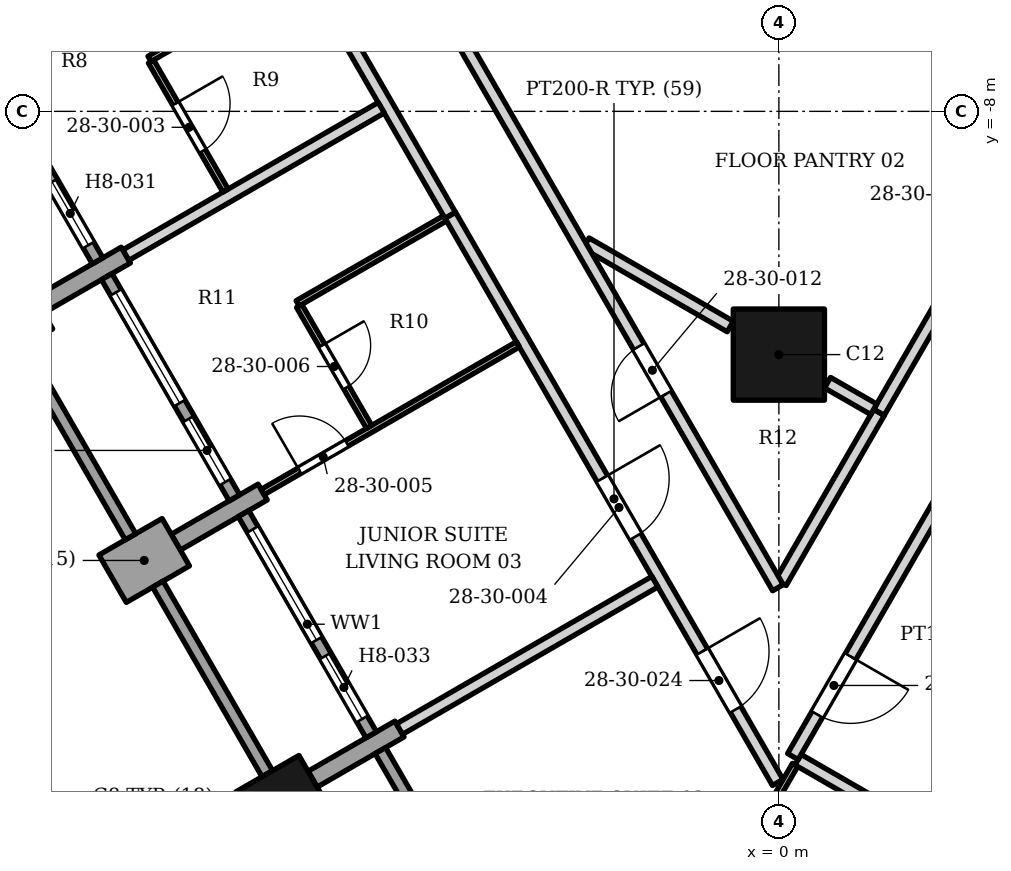
"""IFC4 building model, lengths in metres.
Left out: names, types, materials, properties, quantities, classifications, styles, units other than length and angle.
Written with IfcOpenShell. Run it as: python <this file> out.ifc"""

import sys

from ifc_helpers import new_model, si_unit, direction, frame, frame_2d, origin, origin_2d, place, context, subcontext, project, spatial, rectangle, extrude, element, fill, save


model = new_model("IFC4")
c1 = context("Model", 3, precision=1e-05, world=origin(), true_north=direction((0.0, 1.0)))
c2 = subcontext(c1, "Body", "Model", "MODEL_VIEW")
j1 = project(units=[si_unit("LENGTHUNIT", "METRE"), si_unit("PLANEANGLEUNIT", "RADIAN")], contexts=[c1])
p1 = place(None, origin())
s1 = spatial("IfcSite", under=j1, at=p1, CompositionType="ELEMENT")
p2 = place(p1, origin())
s2 = spatial("IfcBuilding", under=s1, at=p2, CompositionType="ELEMENT")
p3 = place(p2, frame((0.0, 0.0, 122.4)))
s3 = spatial("IfcBuildingStorey", under=s2, at=p3, CompositionType="ELEMENT", Elevation=122.4)
p4 = place(p3, frame((0.0, -12.0, 0.0), z_axis=(0.0, 0.0, 1.0), x_axis=(1.0, 0.0, 0.0)))
e1 = element("IfcColumn", 1, at=p4, inside=s3, PredefinedType="COLUMN", context=c2, shape_type="SweptSolid", body=[
    extrude(rectangle(XDim=1.5, YDim=1.5, at=origin_2d()), origin(), (0.0, 0.0, 1.0), 3.4),
])
for number, where, z_axis, x_axis in (
    (2, (-12.688, -11.488, 0.0), (0.0, 0.0, 1.0), (0.5, -0.866, 0.0)),
    (3, (-8.188, -19.282, 0.0), (0.0, 0.0, 1.0), (0.5, -0.866, 0.0)),
):
    element("IfcColumn", number, at=place(p3, frame(where, z_axis=z_axis, x_axis=x_axis)), inside=s3, PredefinedType="COLUMN", context=c2, shape_type="SweptSolid", body=[
        extrude(rectangle(XDim=0.9, YDim=1.2, at=origin_2d()), origin(), (0.0, 0.0, 1.0), 3.4),
    ])
p5 = place(p3, frame((-12.168, -11.188, 0.0), z_axis=(0.0, 0.0, 1.0), x_axis=(0.865966208357, 0.500102515474, 0.0)))
e4 = element("IfcWall", 4, at=p5, inside=s3, PredefinedType="SOLIDWALL", context=c2, shape_type="SweptSolid", body=[
    extrude(rectangle(XDim=1.65, YDim=0.3, at=frame_2d((0.825, 0.0))), origin(), (0.0, 0.0, 1.0), 2.242),
])
p6 = place(p3, frame((-10.958, -15.685, 0.0), z_axis=(0.0, 0.0, 1.0), x_axis=(0.866043267704, 0.499969057507, 0.0)))
e5 = element("IfcWall", 5, at=p6, inside=s3, PredefinedType="SOLIDWALL", context=c2, shape_type="SweptSolid", body=[
    extrude(rectangle(XDim=1.2, YDim=0.9, at=frame_2d((0.6, 0.0))), origin(), (0.0, 0.0, 1.0), 2.63),
])
p7 = place(p3, frame((-9.919, -15.085, 0.0), z_axis=(0.0, 0.0, 1.0), x_axis=(0.866040211805, 0.499974350878, 0.0)))
e6 = element("IfcWall", 6, at=p7, inside=s3, PredefinedType="SOLIDWALL", context=c2, shape_type="SweptSolid", body=[
    extrude(rectangle(XDim=1.65, YDim=0.3, at=frame_2d((0.825, 0.0))), origin(), (0.0, 0.0, 1.0), 2.65),
])
p8 = place(p3, frame((-6.24, -18.157, 0.0), z_axis=(0.0, 0.0, 1.0), x_axis=(-0.866030301974, -0.499991515992, 0.0)))
e7 = element("IfcWall", 7, at=p8, inside=s3, PredefinedType="SOLIDWALL", context=c2, shape_type="SweptSolid", body=[
    extrude(rectangle(XDim=1.649, YDim=0.3, at=frame_2d((0.825, 0.0))), origin(), (0.0, 0.0, 1.0), 2.65),
])
p9 = place(p3, frame((-13.304, -6.821, 0.0), z_axis=(0.0, 0.0, 1.0), x_axis=(0.500027713859, -0.866009402589, 0.0)))
e8 = element("IfcWall", 8, at=p9, inside=s3, PredefinedType="ELEMENTEDWALL", context=c2, shape_type="SweptSolid", body=[
    extrude(rectangle(XDim=4.2, YDim=0.2, at=frame_2d((2.1, 0.0))), origin(), (0.0, 0.0, 1.0), 2.242),
])
p10 = place(p9, frame((0.3, 0.0, 0.6)))
e9 = element("IfcOpeningElement", 9, at=p10, cuts=e8, PredefinedType="OPENING", context=c2, shape_type="SweptSolid", body=[
    extrude(rectangle(XDim=2.1, YDim=1.54, at=frame_2d((1.05, 0.77))), frame((0.0, 0.11, 0.0), z_axis=(0.0, -1.0, 0.0), x_axis=(1.0, 0.0, 0.0)), (0.0, 0.0, 1.0), 0.22),
])
p11 = place(p9, frame((2.7, 0.0, 0.0)))
e10 = element("IfcOpeningElement", 10, at=p11, cuts=e8, PredefinedType="OPENING", context=c2, shape_type="SweptSolid", body=[
    extrude(rectangle(XDim=1.2, YDim=2.14, at=frame_2d((0.6, 1.07))), frame((0.0, 0.11, 0.0), z_axis=(0.0, -1.0, 0.0), x_axis=(1.0, 0.0, 0.0)), (0.0, 0.0, 1.0), 0.22),
])
p12 = place(p3, frame((-12.463, -11.878, 0.0), z_axis=(0.0, 0.0, 1.0), x_axis=(0.500012057535, -0.866018442252, 0.0)))
e11 = element("IfcWall", 11, at=p12, inside=s3, PredefinedType="SOLIDWALL", context=c2, shape_type="SweptSolid", body=[
    extrude(rectangle(XDim=3.6, YDim=0.2, at=frame_2d((1.8, 0.0))), origin(), (0.0, 0.0, 1.0), 2.45),
])
p13 = place(p3, frame((-11.054, -10.718, 0.0), z_axis=(0.0, 0.0, 1.0), x_axis=(0.500027713859, -0.866009402589, 0.0)))
e12 = element("IfcWall", 12, at=p13, inside=s3, PredefinedType="ELEMENTEDWALL", context=c2, shape_type="SweptSolid", body=[
    extrude(rectangle(XDim=4.2, YDim=0.2, at=frame_2d((2.1, 0.0))), origin(), (0.0, 0.0, 1.0), 2.242),
])
p14 = place(p13, frame((0.3, 0.0, 0.6)))
e13 = element("IfcOpeningElement", 13, at=p14, cuts=e12, PredefinedType="OPENING", context=c2, shape_type="SweptSolid", body=[
    extrude(rectangle(XDim=2.1, YDim=1.54, at=frame_2d((1.05, 0.77))), frame((0.0, 0.11, 0.0), z_axis=(0.0, -1.0, 0.0), x_axis=(1.0, 0.0, 0.0)), (0.0, 0.0, 1.0), 0.22),
])
p15 = place(p13, frame((2.7, 0.0, 0.0)))
e14 = element("IfcOpeningElement", 14, at=p15, cuts=e12, PredefinedType="OPENING", context=c2, shape_type="SweptSolid", body=[
    extrude(rectangle(XDim=1.2, YDim=2.14, at=frame_2d((0.6, 1.07))), frame((0.0, 0.11, 0.0), z_axis=(0.0, -1.0, 0.0), x_axis=(1.0, 0.0, 0.0)), (0.0, 0.0, 1.0), 0.22),
])
p16 = place(p3, frame((-10.213, -15.775, 0.0), z_axis=(0.0, 0.0, 1.0), x_axis=(0.500012057535, -0.866018442252, 0.0)))
e15 = element("IfcWall", 15, at=p16, inside=s3, PredefinedType="SOLIDWALL", context=c2, shape_type="SweptSolid", body=[
    extrude(rectangle(XDim=3.6, YDim=0.2, at=frame_2d((1.8, 0.0))), origin(), (0.0, 0.0, 1.0), 2.63),
])
p17 = place(p3, frame((-8.804, -14.615, 0.0), z_axis=(0.0, 0.0, 1.0), x_axis=(0.500002543286, -0.866023935413, 0.0)))
e16 = element("IfcWall", 16, at=p17, inside=s3, PredefinedType="ELEMENTEDWALL", context=c2, shape_type="SweptSolid", body=[
    extrude(rectangle(XDim=4.2, YDim=0.2, at=frame_2d((2.1, 0.0))), origin(), (0.0, 0.0, 1.0), 2.65),
])
p18 = place(p17, frame((0.3, 0.0, 0.6)))
e17 = element("IfcOpeningElement", 17, at=p18, cuts=e16, PredefinedType="OPENING", context=c2, shape_type="SweptSolid", body=[
    extrude(rectangle(XDim=2.1, YDim=1.8, at=frame_2d((1.05, 0.9))), frame((0.0, 0.11, 0.0), z_axis=(0.0, -1.0, 0.0), x_axis=(1.0, 0.0, 0.0)), (0.0, 0.0, 1.0), 0.22),
])
p19 = place(p17, frame((2.7, 0.0, 0.0)))
e18 = element("IfcOpeningElement", 18, at=p19, cuts=e16, PredefinedType="OPENING", context=c2, shape_type="SweptSolid", body=[
    extrude(rectangle(XDim=1.2, YDim=2.4, at=frame_2d((0.6, 1.2))), frame((0.0, 0.11, 0.0), z_axis=(0.0, -1.0, 0.0), x_axis=(1.0, 0.0, 0.0)), (0.0, 0.0, 1.0), 0.22),
])
p20 = place(p3, frame((-6.554, -18.512, 0.0), z_axis=(0.0, 0.0, 1.0), x_axis=(0.500027713859, -0.866009402589, 0.0)))
e19 = element("IfcWall", 19, at=p20, inside=s3, PredefinedType="ELEMENTEDWALL", context=c2, shape_type="SweptSolid", body=[
    extrude(rectangle(XDim=4.2, YDim=0.2, at=frame_2d((2.1, 0.0))), origin(), (0.0, 0.0, 1.0), 2.474),
])
p21 = place(p3, frame((-5.405, -9.708, 0.0), z_axis=(0.0, 0.0, 1.0), x_axis=(0.500010215181, -0.866019505967, 0.0)))
e20 = element("IfcWall", 20, at=p21, inside=s3, PredefinedType="PARTITIONING", context=c2, shape_type="SweptSolid", body=[
    extrude(rectangle(XDim=10.771, YDim=0.2, at=frame_2d((5.386, 0.0))), origin(), (0.0, 0.0, 1.0), 2.242),
])
p22 = place(p21, frame((5.0, 0.0, 0.0)))
e21 = element("IfcOpeningElement", 21, at=p22, cuts=e20, PredefinedType="OPENING", context=c2, shape_type="SweptSolid", body=[
    extrude(rectangle(XDim=1.1, YDim=2.1, at=frame_2d((0.55, 1.05))), frame((0.0, 0.11, 0.0), z_axis=(0.0, -1.0, 0.0), x_axis=(1.0, 0.0, 0.0)), (0.0, 0.0, 1.0), 0.22),
])
p23 = place(p21, frame((8.286, 0.0, 0.0)))
e22 = element("IfcOpeningElement", 22, at=p23, cuts=e20, PredefinedType="OPENING", context=c2, shape_type="SweptSolid", body=[
    extrude(rectangle(XDim=1.1, YDim=2.1, at=frame_2d((0.55, 1.05))), frame((0.0, 0.11, 0.0), z_axis=(0.0, -1.0, 0.0), x_axis=(1.0, 0.0, 0.0)), (0.0, 0.0, 1.0), 0.22),
])
p24 = place(p3, frame((-0.76, -20.522, 0.0), z_axis=(0.0, 0.0, 1.0), x_axis=(0.500646589026, 0.865651773461, 0.0)))
e23 = element("IfcWall", 23, at=p24, inside=s3, PredefinedType="PARTITIONING", context=c2, shape_type="SweptSolid", body=[
    extrude(rectangle(XDim=2.05, YDim=0.1, at=frame_2d((1.025, 0.0))), origin(), (0.0, 0.0, 1.0), 2.474),
])
p25 = place(p3, frame((0.314, -18.661, 0.0), z_axis=(0.0, 0.0, 1.0), x_axis=(0.866027263711, -0.4999967785, 0.0)))
e24 = element("IfcWall", 24, at=p25, inside=s3, PredefinedType="PARTITIONING", context=c2, shape_type="SweptSolid", body=[
    extrude(rectangle(XDim=5.649, YDim=0.2, at=frame_2d((2.825, 0.0))), origin(), (0.0, 0.0, 1.0), 2.384),
])
p26 = place(p3, frame((-6.24, -18.158, 0.0), z_axis=(0.0, 0.0, 1.0), x_axis=(0.866175528751, 0.499739885733, 0.0)))
e25 = element("IfcWall", 25, at=p26, inside=s3, PredefinedType="PARTITIONING", context=c2, shape_type="SweptSolid", body=[
    extrude(rectangle(XDim=4.85, YDim=0.2, at=frame_2d((2.425, 0.0))), origin(), (0.0, 0.0, 1.0), 2.384),
])
p27 = place(p3, frame((0.033, -15.748, 0.0), z_axis=(0.0, 0.0, 1.0), x_axis=(0.50002566634, 0.866010584809, 0.0)))
e26 = element("IfcWall", 26, at=p27, inside=s3, PredefinedType="PARTITIONING", context=c2, shape_type="SweptSolid", body=[
    extrude(rectangle(XDim=3.229, YDim=0.2, at=frame_2d((1.615, 0.0))), origin(), (0.0, 0.0, 1.0), 2.474),
])
p28 = place(p3, frame((-8.49, -14.26, 0.0), z_axis=(0.0, 0.0, 1.0), x_axis=(0.86557903767, 0.500772333047, 0.0)))
e27 = element("IfcWall", 27, at=p28, inside=s3, PredefinedType="PARTITIONING", context=c2, shape_type="SweptSolid", body=[
    extrude(rectangle(XDim=4.85, YDim=0.1, at=frame_2d((2.425, 0.0))), origin(), (0.0, 0.0, 1.0), 2.242),
])
p29 = place(p28, frame((0.7, 0.0, 0.0)))
e28 = element("IfcOpeningElement", 28, at=p29, cuts=e27, PredefinedType="OPENING", context=c2, shape_type="SweptSolid", body=[
    extrude(rectangle(XDim=0.9, YDim=2.1, at=frame_2d((0.45, 1.05))), frame((0.0, 0.06, 0.0), z_axis=(0.0, -1.0, 0.0), x_axis=(1.0, 0.0, 0.0)), (0.0, 0.0, 1.0), 0.12),
])
p30 = place(p3, frame((1.647, -12.948, 0.0), z_axis=(0.0, 0.0, 1.0), x_axis=(0.500209850425, 0.865904212681, 0.0)))
e29 = element("IfcWall", 29, at=p30, inside=s3, PredefinedType="PARTITIONING", context=c2, shape_type="SweptSolid", body=[
    extrude(rectangle(XDim=8.166, YDim=0.2, at=frame_2d((4.083, 0.0))), origin(), (0.0, 0.0, 1.0), 2.242),
])
p31 = place(p30, frame((3.682, 0.0, 0.0)))
e30 = element("IfcOpeningElement", 30, at=p31, cuts=e29, PredefinedType="OPENING", context=c2, shape_type="SweptSolid", body=[
    extrude(rectangle(XDim=0.9, YDim=2.1, at=frame_2d((0.45, 1.05))), frame((0.0, 0.11, 0.0), z_axis=(0.0, -1.0, 0.0), x_axis=(1.0, 0.0, 0.0)), (0.0, 0.0, 1.0), 0.22),
])
p32 = place(p3, frame((0.8, -12.462, 0.0), z_axis=(0.0, 0.0, 1.0), x_axis=(0.866903294585, -0.498476356347, 0.0)))
e31 = element("IfcWall", 31, at=p32, inside=s3, PredefinedType="PARTITIONING", context=c2, shape_type="SweptSolid", body=[
    extrude(rectangle(XDim=0.877, YDim=0.2, at=frame_2d((0.438, 0.0))), origin(), (0.0, 0.0, 1.0), 3.23),
])
p33 = place(p3, frame((-7.889, -11.2, 0.0), z_axis=(0.0, 0.0, 1.0), x_axis=(0.500697021662, -0.865622603967, 0.0)))
e32 = element("IfcWall", 32, at=p33, inside=s3, PredefinedType="PARTITIONING", context=c2, shape_type="SweptSolid", body=[
    extrude(rectangle(XDim=2.298, YDim=0.1, at=frame_2d((1.149, 0.0))), origin(), (0.0, 0.0, 1.0), 2.242),
])
p34 = place(p33, frame((0.75, 0.0, 0.0)))
e33 = element("IfcOpeningElement", 33, at=p34, cuts=e32, PredefinedType="OPENING", context=c2, shape_type="SweptSolid", body=[
    extrude(rectangle(XDim=0.8, YDim=2.1, at=frame_2d((0.4, 1.05))), frame((0.0, 0.06, 0.0), z_axis=(0.0, -1.0, 0.0), x_axis=(1.0, 0.0, 0.0)), (0.0, 0.0, 1.0), 0.12),
])
p35 = place(p3, frame((-3.171, -10.168, 0.0), z_axis=(0.0, 0.0, 1.0), x_axis=(0.865863357012, -0.500280568265, 0.0)))
e34 = element("IfcWall", 34, at=p35, inside=s3, PredefinedType="PARTITIONING", context=c2, shape_type="SweptSolid", body=[
    extrude(rectangle(XDim=2.739, YDim=0.2, at=frame_2d((1.369, 0.0))), origin(), (0.0, 0.0, 1.0), 2.242),
])
p36 = place(p3, frame((-7.914, -11.157, 0.0), z_axis=(0.0, 0.0, 1.0), x_axis=(0.866288634608, 0.499543793424, 0.0)))
e35 = element("IfcWall", 35, at=p36, inside=s3, PredefinedType="PARTITIONING", context=c2, shape_type="SweptSolid", body=[
    extrude(rectangle(XDim=2.8, YDim=0.1, at=frame_2d((1.4, 0.0))), origin(), (0.0, 0.0, 1.0), 2.242),
])
p37 = place(p3, frame((-13.143, 3.7, 0.0), z_axis=(0.0, 0.0, 1.0), x_axis=(0.499816656841, -0.866131231133, 0.0)))
e36 = element("IfcWall", 36, at=p37, inside=s3, PredefinedType="PARTITIONING", context=c2, shape_type="SweptSolid", body=[
    extrude(rectangle(XDim=15.48, YDim=0.2, at=frame_2d((7.74, 0.0))), origin(), (0.0, 0.0, 1.0), 2.242),
])
p38 = place(p37, frame((3.64, 0.0, 0.0)))
e37 = element("IfcOpeningElement", 37, at=p38, cuts=e36, PredefinedType="OPENING", context=c2, shape_type="SweptSolid", body=[
    extrude(rectangle(XDim=1.6, YDim=2.1, at=frame_2d((0.8, 1.05))), frame((0.0, 0.11, 0.0), z_axis=(0.0, -1.0, 0.0), x_axis=(1.0, 0.0, 0.0)), (0.0, 0.0, 1.0), 0.22),
])
p39 = place(p37, frame((9.381, 0.0, 0.0)))
e38 = element("IfcOpeningElement", 38, at=p39, cuts=e36, PredefinedType="OPENING", context=c2, shape_type="SweptSolid", body=[
    extrude(rectangle(XDim=1.1, YDim=2.1, at=frame_2d((0.55, 1.05))), frame((0.0, 0.11, 0.0), z_axis=(0.0, -1.0, 0.0), x_axis=(1.0, 0.0, 0.0)), (0.0, 0.0, 1.0), 0.22),
])
p40 = place(p3, frame((-10.74, -10.363, 0.0), z_axis=(0.0, 0.0, 1.0), x_axis=(0.866231677814, 0.499642552583, 0.0)))
e39 = element("IfcWall", 39, at=p40, inside=s3, PredefinedType="PARTITIONING", context=c2, shape_type="SweptSolid", body=[
    extrude(rectangle(XDim=4.85, YDim=0.2, at=frame_2d((2.425, 0.0))), origin(), (0.0, 0.0, 1.0), 2.242),
])
p41 = place(p3, frame((-10.326, -7.18, 0.0), z_axis=(0.0, 0.0, 1.0), x_axis=(0.500018594424, -0.866014668023, 0.0)))
e40 = element("IfcWall", 40, at=p41, inside=s3, PredefinedType="PARTITIONING", context=c2, shape_type="SweptSolid", body=[
    extrude(rectangle(XDim=2.45, YDim=0.1, at=frame_2d((1.225, 0.0))), origin(), (0.0, 0.0, 1.0), 2.474),
])
p42 = place(p41, frame((0.8, 0.0, 0.0)))
e41 = element("IfcOpeningElement", 41, at=p42, cuts=e40, PredefinedType="OPENING", context=c2, shape_type="SweptSolid", body=[
    extrude(rectangle(XDim=0.9, YDim=2.1, at=frame_2d((0.45, 1.05))), frame((0.0, 0.06, 0.0), z_axis=(0.0, -1.0, 0.0), x_axis=(1.0, 0.0, 0.0)), (0.0, 0.0, 1.0), 0.12),
])
p43 = place(p3, frame((-5.763, -5.88, 0.0), z_axis=(0.0, 0.0, 1.0), x_axis=(0.500006842847, -0.866021453029, 0.0)))
e42 = element("IfcWall", 42, at=p43, inside=s3, PredefinedType="PARTITIONING", context=c2, shape_type="SweptSolid", body=[
    extrude(rectangle(XDim=11.493, YDim=0.2, at=frame_2d((5.747, 0.0))), origin(), (0.0, 0.0, 1.0), 2.242),
])
p44 = place(p43, frame((6.914, 0.0, 0.0)))
e43 = element("IfcOpeningElement", 43, at=p44, cuts=e42, PredefinedType="OPENING", context=c2, shape_type="SweptSolid", body=[
    extrude(rectangle(XDim=0.9, YDim=2.1, at=frame_2d((0.45, 1.05))), frame((0.0, 0.11, 0.0), z_axis=(0.0, -1.0, 0.0), x_axis=(1.0, 0.0, 0.0)), (0.0, 0.0, 1.0), 0.22),
])
p45 = place(p3, frame((-10.351, -7.137, 0.0), z_axis=(0.0, 0.0, 1.0), x_axis=(0.86625706142, 0.499598542372, 0.0)))
e44 = element("IfcWall", 44, at=p45, inside=s3, PredefinedType="PARTITIONING", context=c2, shape_type="SweptSolid", body=[
    extrude(rectangle(XDim=2.9, YDim=0.1, at=frame_2d((1.45, 0.0))), origin(), (0.0, 0.0, 1.0), 2.474),
])
p46 = place(p3, frame((0.23, -18.61, 0.0), z_axis=(0.0, 0.0, 1.0), x_axis=(0.499999197515, 0.866025867099, 0.0)))
e45 = element("IfcWall", 45, at=p46, inside=s3, PredefinedType="PARTITIONING", context=c2, shape_type="SweptSolid", body=[
    extrude(rectangle(XDim=25.76, YDim=0.2, at=frame_2d((12.88, 0.0))), origin(), (0.0, 0.0, 1.0), 2.242),
])
p47 = place(p46, frame((0.8, 0.0, 0.0)))
e46 = element("IfcOpeningElement", 46, at=p47, cuts=e45, PredefinedType="OPENING", context=c2, shape_type="SweptSolid", body=[
    extrude(rectangle(XDim=1.1, YDim=2.1, at=frame_2d((0.55, 1.05))), frame((0.0, 0.11, 0.0), z_axis=(0.0, -1.0, 0.0), x_axis=(1.0, 0.0, 0.0)), (0.0, 0.0, 1.0), 0.22),
])
p48 = place(p46, frame((14.95, 0.0, 0.0)))
e47 = element("IfcOpeningElement", 47, at=p48, cuts=e45, PredefinedType="OPENING", context=c2, shape_type="SweptSolid", body=[
    extrude(rectangle(XDim=1.6, YDim=2.1, at=frame_2d((0.8, 1.05))), frame((0.0, 0.11, 0.0), z_axis=(0.0, -1.0, 0.0), x_axis=(1.0, 0.0, 0.0)), (0.0, 0.0, 1.0), 0.22),
])
p49 = place(p46, frame((23.58, 0.0, 0.0)))
e48 = element("IfcOpeningElement", 48, at=p49, cuts=e45, PredefinedType="OPENING", context=c2, shape_type="SweptSolid", body=[
    extrude(rectangle(XDim=1.1, YDim=2.1, at=frame_2d((0.55, 1.05))), frame((0.0, 0.11, 0.0), z_axis=(0.0, -1.0, 0.0), x_axis=(1.0, 0.0, 0.0)), (0.0, 0.0, 1.0), 0.22),
])
p50 = place(p11, origin())
e49 = element("IfcDoor", 49, at=p50, inside=s3, OperationType="SINGLE_SWING_LEFT", PredefinedType="DOOR", context=c2, shape_type="SweptSolid", body=[
    extrude(rectangle(XDim=1.2, YDim=2.14, at=frame_2d((0.6, 1.07))), frame((0.0, 0.025, 0.0), z_axis=(0.0, -1.0, 0.0), x_axis=(1.0, 0.0, 0.0)), (0.0, 0.0, 1.0), 0.05),
])
fill(e10, e49)
p51 = place(p14, origin())
e50 = element("IfcWindow", 50, at=p51, inside=s3, PartitioningType="SINGLE_PANEL", PredefinedType="WINDOW", context=c2, shape_type="SweptSolid", body=[
    extrude(rectangle(XDim=2.1, YDim=1.54, at=frame_2d((1.05, 0.77))), frame((0.0, 0.03, 0.0), z_axis=(0.0, -1.0, 0.0), x_axis=(1.0, 0.0, 0.0)), (0.0, 0.0, 1.0), 0.06),
])
fill(e13, e50)
p52 = place(p15, origin())
e51 = element("IfcDoor", 51, at=p52, inside=s3, OperationType="SINGLE_SWING_LEFT", PredefinedType="DOOR", context=c2, shape_type="SweptSolid", body=[
    extrude(rectangle(XDim=1.2, YDim=2.14, at=frame_2d((0.6, 1.07))), frame((0.0, 0.025, 0.0), z_axis=(0.0, -1.0, 0.0), x_axis=(1.0, 0.0, 0.0)), (0.0, 0.0, 1.0), 0.05),
])
fill(e14, e51)
p53 = place(p18, origin())
e52 = element("IfcWindow", 52, at=p53, inside=s3, PartitioningType="SINGLE_PANEL", PredefinedType="WINDOW", context=c2, shape_type="SweptSolid", body=[
    extrude(rectangle(XDim=2.1, YDim=1.8, at=frame_2d((1.05, 0.9))), frame((0.0, 0.03, 0.0), z_axis=(0.0, -1.0, 0.0), x_axis=(1.0, 0.0, 0.0)), (0.0, 0.0, 1.0), 0.06),
])
fill(e17, e52)
p54 = place(p19, origin())
e53 = element("IfcDoor", 53, at=p54, inside=s3, OperationType="SINGLE_SWING_LEFT", PredefinedType="DOOR", context=c2, shape_type="SweptSolid", body=[
    extrude(rectangle(XDim=1.2, YDim=2.4, at=frame_2d((0.6, 1.2))), frame((0.0, 0.025, 0.0), z_axis=(0.0, -1.0, 0.0), x_axis=(1.0, 0.0, 0.0)), (0.0, 0.0, 1.0), 0.05),
])
fill(e18, e53)
p55 = place(p42, origin())
e54 = element("IfcDoor", 54, at=p55, inside=s3, OperationType="SINGLE_SWING_LEFT", PredefinedType="DOOR", context=c2, shape_type="SweptSolid", body=[
    extrude(rectangle(XDim=0.9, YDim=2.1, at=frame_2d((0.45, 1.05))), frame((0.0, 0.025, 0.0), z_axis=(0.0, -1.0, 0.0), x_axis=(1.0, 0.0, 0.0)), (0.0, 0.0, 1.0), 0.05),
])
fill(e41, e54)
p56 = place(p22, origin())
e55 = element("IfcDoor", 55, at=p56, inside=s3, OperationType="SINGLE_SWING_LEFT", PredefinedType="DOOR", context=c2, shape_type="SweptSolid", body=[
    extrude(rectangle(XDim=1.1, YDim=2.1, at=frame_2d((0.55, 1.05))), frame((0.0, 0.025, 0.0), z_axis=(0.0, -1.0, 0.0), x_axis=(1.0, 0.0, 0.0)), (0.0, 0.0, 1.0), 0.05),
])
fill(e21, e55)
p57 = place(p29, origin())
e56 = element("IfcDoor", 56, at=p57, inside=s3, OperationType="SINGLE_SWING_LEFT", PredefinedType="DOOR", context=c2, shape_type="SweptSolid", body=[
    extrude(rectangle(XDim=0.9, YDim=2.1, at=frame_2d((0.45, 1.05))), frame((0.0, 0.025, 0.0), z_axis=(0.0, -1.0, 0.0), x_axis=(1.0, 0.0, 0.0)), (0.0, 0.0, 1.0), 0.05),
])
fill(e28, e56)
p58 = place(p34, origin())
e57 = element("IfcDoor", 57, at=p58, inside=s3, OperationType="SINGLE_SWING_LEFT", PredefinedType="DOOR", context=c2, shape_type="SweptSolid", body=[
    extrude(rectangle(XDim=0.8, YDim=2.1, at=frame_2d((0.4, 1.05))), frame((0.0, 0.025, 0.0), z_axis=(0.0, -1.0, 0.0), x_axis=(1.0, 0.0, 0.0)), (0.0, 0.0, 1.0), 0.05),
])
fill(e33, e57)
p59 = place(p47, origin())
e58 = element("IfcDoor", 58, at=p59, inside=s3, OperationType="SINGLE_SWING_RIGHT", PredefinedType="DOOR", context=c2, shape_type="SweptSolid", body=[
    extrude(rectangle(XDim=1.1, YDim=2.1, at=frame_2d((0.55, 1.05))), frame((0.0, 0.025, 0.0), z_axis=(0.0, -1.0, 0.0), x_axis=(1.0, 0.0, 0.0)), (0.0, 0.0, 1.0), 0.05),
])
fill(e46, e58)
p60 = place(p44, origin())
e59 = element("IfcDoor", 59, at=p60, inside=s3, OperationType="SINGLE_SWING_RIGHT", PredefinedType="DOOR", context=c2, shape_type="SweptSolid", body=[
    extrude(rectangle(XDim=0.9, YDim=2.1, at=frame_2d((0.45, 1.05))), frame((0.0, 0.025, 0.0), z_axis=(0.0, -1.0, 0.0), x_axis=(1.0, 0.0, 0.0)), (0.0, 0.0, 1.0), 0.05),
])
fill(e43, e59)
p61 = place(p23, origin())
e60 = element("IfcDoor", 60, at=p61, inside=s3, OperationType="SINGLE_SWING_LEFT", PredefinedType="DOOR", context=c2, shape_type="SweptSolid", body=[
    extrude(rectangle(XDim=1.1, YDim=2.1, at=frame_2d((0.55, 1.05))), frame((0.0, 0.025, 0.0), z_axis=(0.0, -1.0, 0.0), x_axis=(1.0, 0.0, 0.0)), (0.0, 0.0, 1.0), 0.05),
])
fill(e22, e60)
save(model, sys.argv[1])
